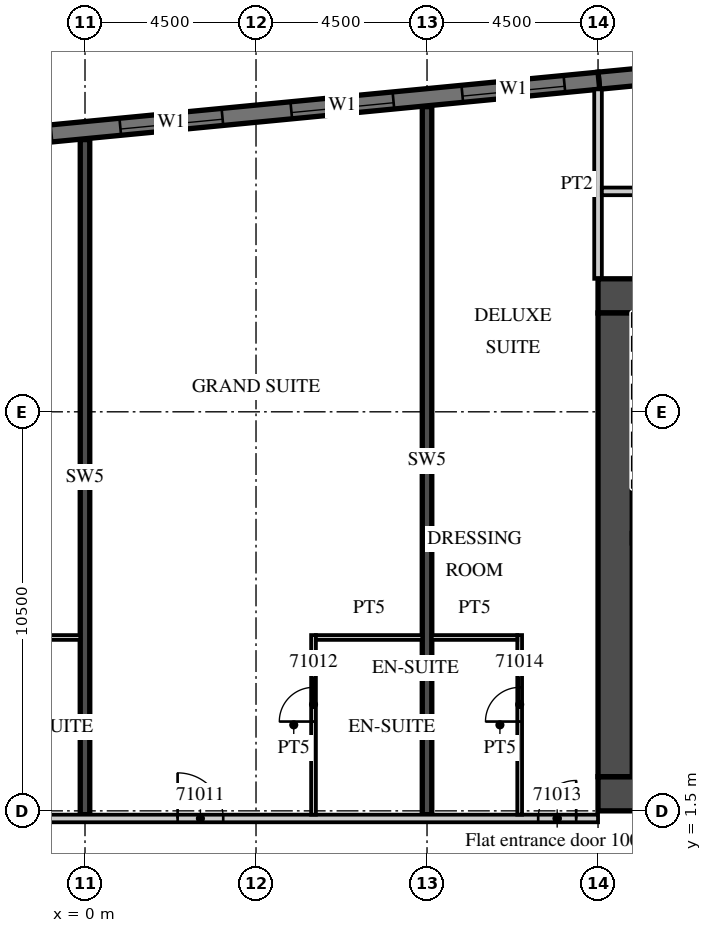
"""IFC4 building model, lengths in metres.
Left out: names, types, materials, properties, quantities, classifications, styles, units other than length and angle.
Written with IfcOpenShell. Run it as: python <this file> out.ifc"""

import sys

from ifc_helpers import new_model, si_unit, direction, frame, frame_2d, origin, place, context, subcontext, project, spatial, rectangle, extrude, element, fill, save


model = new_model("IFC4")
c1 = context("Model", 3, precision=1e-05, world=origin(), true_north=direction((0.0, 1.0)))
c2 = subcontext(c1, "Body", "Model", "MODEL_VIEW")
j1 = project(units=[si_unit("LENGTHUNIT", "METRE"), si_unit("PLANEANGLEUNIT", "RADIAN")], contexts=[c1])
p1 = place(None, origin())
s1 = spatial("IfcSite", under=j1, at=p1, CompositionType="ELEMENT")
p2 = place(p1, origin())
s2 = spatial("IfcBuilding", under=s1, at=p2, CompositionType="ELEMENT")
p3 = place(p2, frame((0.0, 0.0, 285.0)))
s3 = spatial("IfcBuildingStorey", under=s2, at=p3, CompositionType="ELEMENT", Elevation=285.0)
p4 = place(p3, frame((0.0, 1.4, 0.0), z_axis=(0.0, 0.0, 1.0), x_axis=(0.0, 1.0, 0.0)))
e1 = element("IfcWall", 1, at=p4, inside=s3, PredefinedType="SHEAR", context=c2, shape_type="SweptSolid", body=[
    extrude(rectangle(XDim=17.763, YDim=0.25, at=frame_2d((8.881, 0.0))), origin(), (0.0, 0.0, 1.0), 3.3),
])
p5 = place(p3, frame((9.0, 1.4, 0.0), z_axis=(0.0, 0.0, 1.0), x_axis=(0.0, 1.0, 0.0)))
e2 = element("IfcWall", 2, at=p5, inside=s3, PredefinedType="SHEAR", context=c2, shape_type="SweptSolid", body=[
    extrude(rectangle(XDim=18.629, YDim=0.25, at=frame_2d((9.315, 0.0))), origin(), (0.0, 0.0, 1.0), 3.3),
])
p6 = place(p3, frame((30.946, 22.391, 0.0), z_axis=(0.0, 0.0, 1.0), x_axis=(-0.995396397117, -0.095843688398, 0.0)))
e3 = element("IfcWall", 3, at=p6, inside=s3, PredefinedType="SOLIDWALL", context=c2, shape_type="SweptSolid", body=[
    extrude(rectangle(XDim=17.505, YDim=0.45, at=frame_2d((8.752, 0.0))), origin(), (0.0, 0.0, 1.0), 3.02),
])
p7 = place(p3, frame((13.521, 20.713, 0.0), z_axis=(0.0, 0.0, 1.0), x_axis=(-0.995396277313, -0.095844932638, 0.0)))
e4 = element("IfcWall", 4, at=p7, inside=s3, PredefinedType="SOLIDWALL", context=c2, shape_type="SweptSolid", body=[
    extrude(rectangle(XDim=51.495, YDim=0.45, at=frame_2d((25.748, 0.0))), origin(), (0.0, 0.0, 1.0), 3.02),
])
p8 = place(p7, frame((0.91, 0.0, 0.45)))
e5 = element("IfcOpeningElement", 5, at=p8, cuts=e4, PredefinedType="OPENING", context=c2, shape_type="SweptSolid", body=[
    extrude(rectangle(XDim=2.7, YDim=2.25, at=frame_2d((1.35, 1.125))), frame((0.0, 0.235, 0.0), z_axis=(0.0, -1.0, 0.0), x_axis=(1.0, 0.0, 0.0)), (0.0, 0.0, 1.0), 0.47),
])
p9 = place(p7, frame((5.431, 0.0, 0.45)))
e6 = element("IfcOpeningElement", 6, at=p9, cuts=e4, PredefinedType="OPENING", context=c2, shape_type="SweptSolid", body=[
    extrude(rectangle(XDim=2.7, YDim=2.25, at=frame_2d((1.35, 1.125))), frame((0.0, 0.235, 0.0), z_axis=(0.0, -1.0, 0.0), x_axis=(1.0, 0.0, 0.0)), (0.0, 0.0, 1.0), 0.47),
])
p10 = place(p7, frame((9.952, 0.0, 0.45)))
e7 = element("IfcOpeningElement", 7, at=p10, cuts=e4, PredefinedType="OPENING", context=c2, shape_type="SweptSolid", body=[
    extrude(rectangle(XDim=2.7, YDim=2.25, at=frame_2d((1.35, 1.125))), frame((0.0, 0.235, 0.0), z_axis=(0.0, -1.0, 0.0), x_axis=(1.0, 0.0, 0.0)), (0.0, 0.0, 1.0), 0.47),
])
p11 = place(p7, frame((14.473, 0.0, 0.45)))
e8 = element("IfcOpeningElement", 8, at=p11, cuts=e4, PredefinedType="OPENING", context=c2, shape_type="SweptSolid", body=[
    extrude(rectangle(XDim=2.7, YDim=2.25, at=frame_2d((1.35, 1.125))), frame((0.0, 0.235, 0.0), z_axis=(0.0, -1.0, 0.0), x_axis=(1.0, 0.0, 0.0)), (0.0, 0.0, 1.0), 0.47),
])
p12 = place(p7, frame((18.994, 0.0, 0.45)))
e9 = element("IfcOpeningElement", 9, at=p12, cuts=e4, PredefinedType="OPENING", context=c2, shape_type="SweptSolid", body=[
    extrude(rectangle(XDim=2.7, YDim=2.25, at=frame_2d((1.35, 1.125))), frame((0.0, 0.235, 0.0), z_axis=(0.0, -1.0, 0.0), x_axis=(1.0, 0.0, 0.0)), (0.0, 0.0, 1.0), 0.47),
])
p13 = place(p7, frame((23.514, 0.0, 0.45)))
e10 = element("IfcOpeningElement", 10, at=p13, cuts=e4, PredefinedType="OPENING", context=c2, shape_type="SweptSolid", body=[
    extrude(rectangle(XDim=2.7, YDim=2.25, at=frame_2d((1.35, 1.125))), frame((0.0, 0.235, 0.0), z_axis=(0.0, -1.0, 0.0), x_axis=(1.0, 0.0, 0.0)), (0.0, 0.0, 1.0), 0.47),
])
p14 = place(p7, frame((28.035, 0.0, 0.45)))
e11 = element("IfcOpeningElement", 11, at=p14, cuts=e4, PredefinedType="OPENING", context=c2, shape_type="SweptSolid", body=[
    extrude(rectangle(XDim=2.7, YDim=2.25, at=frame_2d((1.35, 1.125))), frame((0.0, 0.235, 0.0), z_axis=(0.0, -1.0, 0.0), x_axis=(1.0, 0.0, 0.0)), (0.0, 0.0, 1.0), 0.47),
])
p15 = place(p7, frame((32.556, 0.0, 0.45)))
e12 = element("IfcOpeningElement", 12, at=p15, cuts=e4, PredefinedType="OPENING", context=c2, shape_type="SweptSolid", body=[
    extrude(rectangle(XDim=2.7, YDim=2.25, at=frame_2d((1.35, 1.125))), frame((0.0, 0.235, 0.0), z_axis=(0.0, -1.0, 0.0), x_axis=(1.0, 0.0, 0.0)), (0.0, 0.0, 1.0), 0.47),
])
p16 = place(p7, frame((37.077, 0.0, 0.45)))
e13 = element("IfcOpeningElement", 13, at=p16, cuts=e4, PredefinedType="OPENING", context=c2, shape_type="SweptSolid", body=[
    extrude(rectangle(XDim=2.7, YDim=2.25, at=frame_2d((1.35, 1.125))), frame((0.0, 0.235, 0.0), z_axis=(0.0, -1.0, 0.0), x_axis=(1.0, 0.0, 0.0)), (0.0, 0.0, 1.0), 0.47),
])
p17 = place(p7, frame((41.598, 0.0, 0.45)))
e14 = element("IfcOpeningElement", 14, at=p17, cuts=e4, PredefinedType="OPENING", context=c2, shape_type="SweptSolid", body=[
    extrude(rectangle(XDim=2.7, YDim=2.25, at=frame_2d((1.35, 1.125))), frame((0.0, 0.235, 0.0), z_axis=(0.0, -1.0, 0.0), x_axis=(1.0, 0.0, 0.0)), (0.0, 0.0, 1.0), 0.47),
])
p18 = place(p7, frame((46.118, 0.0, 0.45)))
e15 = element("IfcOpeningElement", 15, at=p18, cuts=e4, PredefinedType="OPENING", context=c2, shape_type="SweptSolid", body=[
    extrude(rectangle(XDim=2.7, YDim=2.25, at=frame_2d((1.35, 1.125))), frame((0.0, 0.235, 0.0), z_axis=(0.0, -1.0, 0.0), x_axis=(1.0, 0.0, 0.0)), (0.0, 0.0, 1.0), 0.47),
])
p19 = place(p3, frame((13.5, 15.5, 0.0), z_axis=(0.0, 0.0, 1.0), x_axis=(0.0, 1.0, 0.0)))
e16 = element("IfcWall", 16, at=p19, inside=s3, PredefinedType="PARTITIONING", context=c2, shape_type="SweptSolid", body=[
    extrude(rectangle(XDim=4.985, YDim=0.2, at=frame_2d((2.493, 0.0))), origin(), (0.0, 0.0, 1.0), 3.02),
])
p20 = place(p3, frame((-39.909, 1.3, 0.0), z_axis=(0.0, 0.0, 1.0), x_axis=(1.0, 0.0, 0.0)))
e17 = element("IfcWall", 17, at=p20, inside=s3, PredefinedType="PARTITIONING", context=c2, shape_type="SweptSolid", body=[
    extrude(rectangle(XDim=53.409, YDim=0.2, at=frame_2d((26.705, 0.0))), origin(), (0.0, 0.0, 1.0), 3.02),
])
p21 = place(p20, frame((0.15, 0.0, 0.0)))
e18 = element("IfcOpeningElement", 18, at=p21, cuts=e17, PredefinedType="OPENING", context=c2, shape_type="SweptSolid", body=[
    extrude(rectangle(XDim=0.9, YDim=2.1, at=frame_2d((0.45, 1.05))), frame((0.0, 0.11, 0.0), z_axis=(0.0, -1.0, 0.0), x_axis=(1.0, 0.0, 0.0)), (0.0, 0.0, 1.0), 0.22),
])
p22 = place(p20, frame((6.347, 0.0, 0.0)))
e19 = element("IfcOpeningElement", 19, at=p22, cuts=e17, PredefinedType="OPENING", context=c2, shape_type="SweptSolid", body=[
    extrude(rectangle(XDim=1.2, YDim=2.1, at=frame_2d((0.6, 1.05))), frame((0.0, 0.11, 0.0), z_axis=(0.0, -1.0, 0.0), x_axis=(1.0, 0.0, 0.0)), (0.0, 0.0, 1.0), 0.22),
])
p23 = place(p20, frame((15.347, 0.0, 0.0)))
e20 = element("IfcOpeningElement", 20, at=p23, cuts=e17, PredefinedType="OPENING", context=c2, shape_type="SweptSolid", body=[
    extrude(rectangle(XDim=1.2, YDim=2.1, at=frame_2d((0.6, 1.05))), frame((0.0, 0.11, 0.0), z_axis=(0.0, -1.0, 0.0), x_axis=(1.0, 0.0, 0.0)), (0.0, 0.0, 1.0), 0.22),
])
p24 = place(p20, frame((24.346, 0.0, 0.0)))
e21 = element("IfcOpeningElement", 21, at=p24, cuts=e17, PredefinedType="OPENING", context=c2, shape_type="SweptSolid", body=[
    extrude(rectangle(XDim=1.2, YDim=2.1, at=frame_2d((0.6, 1.05))), frame((0.0, 0.11, 0.0), z_axis=(0.0, -1.0, 0.0), x_axis=(1.0, 0.0, 0.0)), (0.0, 0.0, 1.0), 0.22),
])
p25 = place(p20, frame((33.346, 0.0, 0.0)))
e22 = element("IfcOpeningElement", 22, at=p25, cuts=e17, PredefinedType="OPENING", context=c2, shape_type="SweptSolid", body=[
    extrude(rectangle(XDim=1.2, YDim=2.1, at=frame_2d((0.6, 1.05))), frame((0.0, 0.11, 0.0), z_axis=(0.0, -1.0, 0.0), x_axis=(1.0, 0.0, 0.0)), (0.0, 0.0, 1.0), 0.22),
])
p26 = place(p20, frame((42.346, 0.0, 0.0)))
e23 = element("IfcOpeningElement", 23, at=p26, cuts=e17, PredefinedType="OPENING", context=c2, shape_type="SweptSolid", body=[
    extrude(rectangle(XDim=1.2, YDim=2.1, at=frame_2d((0.6, 1.05))), frame((0.0, 0.11, 0.0), z_axis=(0.0, -1.0, 0.0), x_axis=(1.0, 0.0, 0.0)), (0.0, 0.0, 1.0), 0.22),
])
p27 = place(p20, frame((51.834, 0.0, 0.0)))
e24 = element("IfcOpeningElement", 24, at=p27, cuts=e17, PredefinedType="OPENING", context=c2, shape_type="SweptSolid", body=[
    extrude(rectangle(XDim=1.0, YDim=2.1, at=frame_2d((0.5, 1.05))), frame((0.0, 0.11, 0.0), z_axis=(0.0, -1.0, 0.0), x_axis=(1.0, 0.0, 0.0)), (0.0, 0.0, 1.0), 0.22),
])
p28 = place(p3, frame((-2.925, 6.062, 0.0), z_axis=(0.0, 0.0, 1.0), x_axis=(1.0, 0.0, 0.0)))
e25 = element("IfcWall", 25, at=p28, inside=s3, PredefinedType="PARTITIONING", context=c2, shape_type="SweptSolid", body=[
    extrude(rectangle(XDim=2.8, YDim=0.125, at=frame_2d((1.4, 0.0))), origin(), (0.0, 0.0, 1.0), 3.02),
])
p29 = place(p3, frame((6.013, 1.4, 0.0), z_axis=(0.0, 0.0, 1.0), x_axis=(0.0, 1.0, 0.0)))
e26 = element("IfcWall", 26, at=p29, inside=s3, PredefinedType="PARTITIONING", context=c2, shape_type="SweptSolid", body=[
    extrude(rectangle(XDim=4.725, YDim=0.125, at=frame_2d((2.363, 0.0))), origin(), (0.0, 0.0, 1.0), 3.02),
])
p30 = place(p29, frame((2.45, 0.0, 0.0)))
e27 = element("IfcOpeningElement", 27, at=p30, cuts=e26, PredefinedType="OPENING", context=c2, shape_type="SweptSolid", body=[
    extrude(rectangle(XDim=0.9, YDim=2.1, at=frame_2d((0.45, 1.05))), frame((0.0, 0.073, 0.0), z_axis=(0.0, -1.0, 0.0), x_axis=(1.0, 0.0, 0.0)), (0.0, 0.0, 1.0), 0.145),
])
p31 = place(p3, frame((6.075, 6.062, 0.0), z_axis=(0.0, 0.0, 1.0), x_axis=(1.0, 0.0, 0.0)))
e28 = element("IfcWall", 28, at=p31, inside=s3, PredefinedType="PARTITIONING", context=c2, shape_type="SweptSolid", body=[
    extrude(rectangle(XDim=2.8, YDim=0.125, at=frame_2d((1.4, 0.0))), origin(), (0.0, 0.0, 1.0), 3.02),
])
p32 = place(p3, frame((11.438, 1.4, 0.0), z_axis=(0.0, 0.0, 1.0), x_axis=(0.0, 1.0, 0.0)))
e29 = element("IfcWall", 29, at=p32, inside=s3, PredefinedType="PARTITIONING", context=c2, shape_type="SweptSolid", body=[
    extrude(rectangle(XDim=4.725, YDim=0.125, at=frame_2d((2.363, 0.0))), origin(), (0.0, 0.0, 1.0), 3.02),
])
p33 = place(p32, frame((2.45, 0.0, 0.0)))
e30 = element("IfcOpeningElement", 30, at=p33, cuts=e29, PredefinedType="OPENING", context=c2, shape_type="SweptSolid", body=[
    extrude(rectangle(XDim=0.9, YDim=2.1, at=frame_2d((0.45, 1.05))), frame((0.0, 0.073, 0.0), z_axis=(0.0, -1.0, 0.0), x_axis=(1.0, 0.0, 0.0)), (0.0, 0.0, 1.0), 0.145),
])
p34 = place(p3, frame((9.125, 6.062, 0.0), z_axis=(0.0, 0.0, 1.0), x_axis=(1.0, 0.0, 0.0)))
e31 = element("IfcWall", 31, at=p34, inside=s3, PredefinedType="PARTITIONING", context=c2, shape_type="SweptSolid", body=[
    extrude(rectangle(XDim=2.25, YDim=0.125, at=frame_2d((1.125, 0.0))), origin(), (0.0, 0.0, 1.0), 3.02),
])
p35 = place(p3, frame((13.5, 1.95, 0.0), z_axis=(0.0, 0.0, 1.0), x_axis=(1.0, 0.0, 0.0)))
e32 = element("IfcWall", 32, at=p35, inside=s3, PredefinedType="SHEAR", context=c2, shape_type="SweptSolid", body=[
    extrude(rectangle(XDim=18.0, YDim=0.9, at=frame_2d((9.0, 0.0))), origin(), (0.0, 0.0, 1.0), 3.02),
])
p36 = place(p35, frame((1.475, 0.0, 0.0)))
e33 = element("IfcOpeningElement", 33, at=p36, cuts=e32, PredefinedType="OPENING", context=c2, shape_type="SweptSolid", body=[
    extrude(rectangle(XDim=1.8, YDim=2.1, at=frame_2d((0.9, 1.05))), frame((0.0, 0.46, 0.0), z_axis=(0.0, -1.0, 0.0), x_axis=(1.0, 0.0, 0.0)), (0.0, 0.0, 1.0), 0.92),
])
p37 = place(p3, frame((13.5, 15.05, 0.0), z_axis=(0.0, 0.0, 1.0), x_axis=(1.0, 0.0, 0.0)))
e34 = element("IfcWall", 34, at=p37, inside=s3, PredefinedType="SHEAR", context=c2, shape_type="SweptSolid", body=[
    extrude(rectangle(XDim=6.8, YDim=0.9, at=frame_2d((3.4, 0.0))), origin(), (0.0, 0.0, 1.0), 3.02),
])
p38 = place(p37, frame((4.725, 0.0, 0.0)))
e35 = element("IfcOpeningElement", 35, at=p38, cuts=e34, PredefinedType="OPENING", context=c2, shape_type="SweptSolid", body=[
    extrude(rectangle(XDim=1.2, YDim=2.1, at=frame_2d((0.6, 1.05))), frame((0.0, 0.46, 0.0), z_axis=(0.0, -1.0, 0.0), x_axis=(1.0, 0.0, 0.0)), (0.0, 0.0, 1.0), 0.92),
])
p39 = place(p3, frame((13.95, 2.4, 0.0), z_axis=(0.0, 0.0, 1.0), x_axis=(0.0, 1.0, 0.0)))
e36 = element("IfcWall", 36, at=p39, inside=s3, PredefinedType="SHEAR", context=c2, shape_type="SweptSolid", body=[
    extrude(rectangle(XDim=12.2, YDim=0.9, at=frame_2d((6.1, 0.0))), origin(), (0.0, 0.0, 1.0), 3.02),
])
p40 = place(p3, frame((13.6, 17.8, 0.0), z_axis=(0.0, 0.0, 1.0), x_axis=(1.0, 0.0, 0.0)))
e37 = element("IfcWall", 37, at=p40, inside=s3, PredefinedType="PARTITIONING", context=c2, shape_type="SweptSolid", body=[
    extrude(rectangle(XDim=21.354, YDim=0.2, at=frame_2d((10.677, 0.0))), origin(), (0.0, 0.0, 1.0), 3.02),
])
p41 = place(p40, frame((17.812, 0.0, 0.0)))
e38 = element("IfcOpeningElement", 38, at=p41, cuts=e37, PredefinedType="OPENING", context=c2, shape_type="SweptSolid", body=[
    extrude(rectangle(XDim=0.9, YDim=2.1, at=frame_2d((0.45, 1.05))), frame((0.0, 0.11, 0.0), z_axis=(0.0, -1.0, 0.0), x_axis=(1.0, 0.0, 0.0)), (0.0, 0.0, 1.0), 0.22),
])
p42 = place(p40, frame((9.512, 0.0, 0.0)))
e39 = element("IfcOpeningElement", 39, at=p42, cuts=e37, PredefinedType="OPENING", context=c2, shape_type="SweptSolid", body=[
    extrude(rectangle(XDim=0.9, YDim=2.1, at=frame_2d((0.45, 1.05))), frame((0.0, 0.11, 0.0), z_axis=(0.0, -1.0, 0.0), x_axis=(1.0, 0.0, 0.0)), (0.0, 0.0, 1.0), 0.22),
])
p43 = place(p8, origin())
e40 = element("IfcWindow", 40, at=p43, inside=s3, PartitioningType="SINGLE_PANEL", PredefinedType="WINDOW", context=c2, shape_type="SweptSolid", body=[
    extrude(rectangle(XDim=2.7, YDim=2.25, at=frame_2d((1.35, 1.125))), frame((0.0, 0.09, 0.0), z_axis=(0.0, -1.0, 0.0), x_axis=(1.0, 0.0, 0.0)), (0.0, 0.0, 1.0), 0.06),
])
fill(e5, e40)
p44 = place(p9, origin())
e41 = element("IfcWindow", 41, at=p44, inside=s3, PartitioningType="SINGLE_PANEL", PredefinedType="WINDOW", context=c2, shape_type="SweptSolid", body=[
    extrude(rectangle(XDim=2.7, YDim=2.25, at=frame_2d((1.35, 1.125))), frame((0.0, 0.09, 0.0), z_axis=(0.0, -1.0, 0.0), x_axis=(1.0, 0.0, 0.0)), (0.0, 0.0, 1.0), 0.06),
])
fill(e6, e41)
p45 = place(p10, origin())
e42 = element("IfcWindow", 42, at=p45, inside=s3, PartitioningType="SINGLE_PANEL", PredefinedType="WINDOW", context=c2, shape_type="SweptSolid", body=[
    extrude(rectangle(XDim=2.7, YDim=2.25, at=frame_2d((1.35, 1.125))), frame((0.0, 0.09, 0.0), z_axis=(0.0, -1.0, 0.0), x_axis=(1.0, 0.0, 0.0)), (0.0, 0.0, 1.0), 0.06),
])
fill(e7, e42)
p46 = place(p26, origin())
e43 = element("IfcDoor", 43, at=p46, inside=s3, OperationType="SINGLE_SWING_LEFT", PredefinedType="DOOR", context=c2, shape_type="SweptSolid", body=[
    extrude(rectangle(XDim=1.2, YDim=2.1, at=frame_2d((0.6, 1.05))), frame((0.0, 0.025, 0.0), z_axis=(0.0, -1.0, 0.0), x_axis=(1.0, 0.0, 0.0)), (0.0, 0.0, 1.0), 0.05),
])
fill(e23, e43)
p47 = place(p30, origin())
e44 = element("IfcDoor", 44, at=p47, inside=s3, OperationType="SINGLE_SWING_LEFT", PredefinedType="DOOR", context=c2, shape_type="SweptSolid", body=[
    extrude(rectangle(XDim=0.9, YDim=2.1, at=frame_2d((0.45, 1.05))), frame((0.0, 0.025, 0.0), z_axis=(0.0, -1.0, 0.0), x_axis=(1.0, 0.0, 0.0)), (0.0, 0.0, 1.0), 0.05),
])
fill(e27, e44)
p48 = place(p27, origin())
e45 = element("IfcDoor", 45, at=p48, inside=s3, OperationType="SINGLE_SWING_RIGHT", PredefinedType="DOOR", context=c2, shape_type="SweptSolid", body=[
    extrude(rectangle(XDim=1.0, YDim=2.1, at=frame_2d((0.5, 1.05))), frame((0.0, 0.025, 0.0), z_axis=(0.0, -1.0, 0.0), x_axis=(1.0, 0.0, 0.0)), (0.0, 0.0, 1.0), 0.05),
])
fill(e24, e45)
p49 = place(p33, origin())
e46 = element("IfcDoor", 46, at=p49, inside=s3, OperationType="SINGLE_SWING_LEFT", PredefinedType="DOOR", context=c2, shape_type="SweptSolid", body=[
    extrude(rectangle(XDim=0.9, YDim=2.1, at=frame_2d((0.45, 1.05))), frame((0.0, 0.025, 0.0), z_axis=(0.0, -1.0, 0.0), x_axis=(1.0, 0.0, 0.0)), (0.0, 0.0, 1.0), 0.05),
])
fill(e30, e46)
save(model, sys.argv[1])
